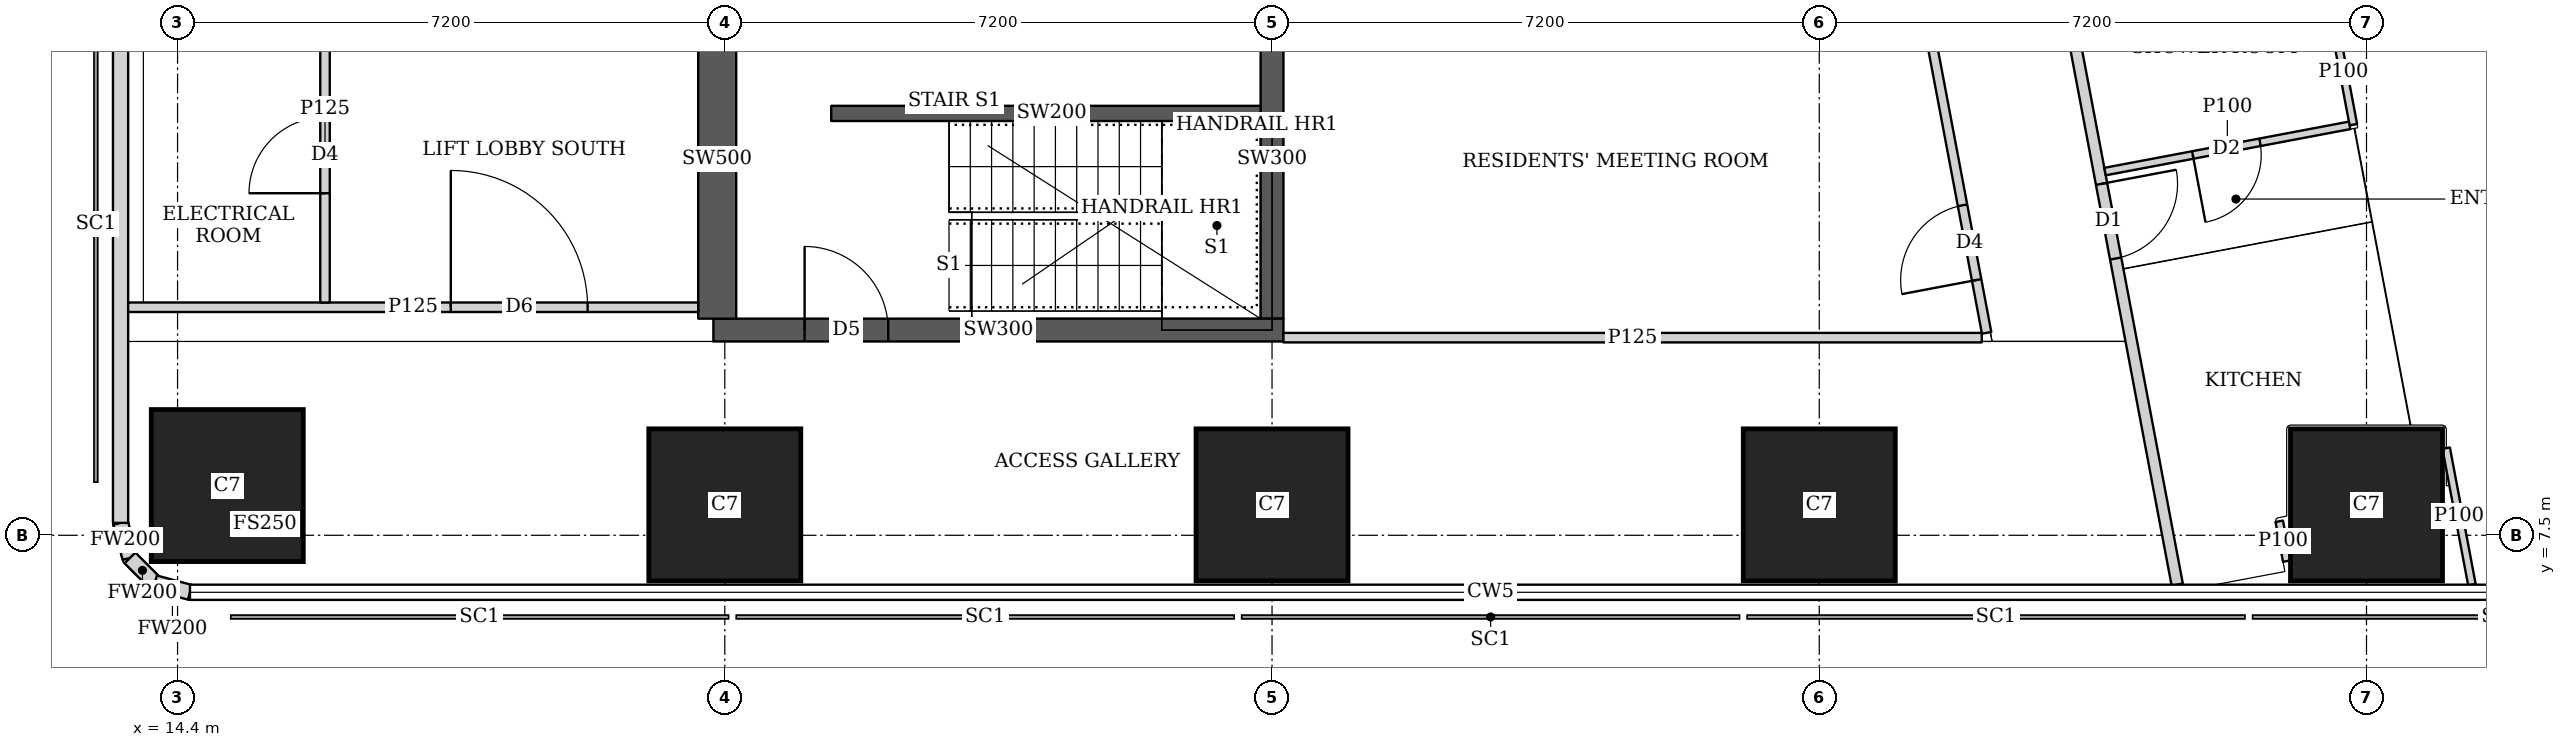
"""IFC4 building model, lengths in metres.
Left out: names, types, materials, properties, quantities, classifications, styles, units other than length and angle.
Written with IfcOpenShell. Run it as: python <this file> out.ifc"""

import sys

from ifc_helpers import new_model, si_unit, direction, frame, frame_2d, origin, origin_2d, place, context, subcontext, project, spatial, rectangle, extrude, element, fill, save


model = new_model("IFC4")
c1 = context("Model", 3, precision=1e-05, world=origin(), true_north=direction((0.0, 1.0)))
c2 = subcontext(c1, "Body", "Model", "MODEL_VIEW")
j1 = project(units=[si_unit("LENGTHUNIT", "METRE"), si_unit("PLANEANGLEUNIT", "RADIAN")], contexts=[c1])
p1 = place(None, origin())
s1 = spatial("IfcSite", under=j1, at=p1, CompositionType="ELEMENT")
p2 = place(p1, origin())
s2 = spatial("IfcBuilding", under=s1, at=p2, CompositionType="ELEMENT")
p3 = place(p2, frame((0.0, 0.0, 262.85)))
s3 = spatial("IfcBuildingStorey", under=s2, at=p3, CompositionType="ELEMENT", Elevation=262.85)
for number, where, z_axis, x_axis in (
    (1, (15.054, 8.154, 0.0), (0.0, 0.0, 1.0), (1.0, 0.0, 0.0)),
    (2, (21.6, 7.9, 0.0), (0.0, 0.0, 1.0), (1.0, 0.0, 0.0)),
    (3, (28.8, 7.9, 0.0), (0.0, 0.0, 1.0), (1.0, 0.0, 0.0)),
    (4, (36.0, 7.9, 0.0), (0.0, 0.0, 1.0), (1.0, 0.0, 0.0)),
    (5, (43.2, 7.9, 0.0), (0.0, 0.0, 1.0), (1.0, 0.0, 0.0)),
):
    element("IfcColumn", number, at=place(p3, frame(where, z_axis=z_axis, x_axis=x_axis)), inside=s3, PredefinedType="COLUMN", context=c2, shape_type="SweptSolid", body=[
        extrude(rectangle(XDim=2.0, YDim=2.0, at=origin_2d()), origin(), (0.0, 0.0, 1.0), 3.75),
    ])
p4 = place(p3, frame((21.45, 10.2, 0.0), z_axis=(0.0, 0.0, 1.0), x_axis=(1.0, 0.0, 0.0)))
e6 = element("IfcWall", 6, at=p4, inside=s3, PredefinedType="SHEAR", context=c2, shape_type="SweptSolid", body=[
    extrude(rectangle(XDim=7.5, YDim=0.3, at=frame_2d((3.75, 0.0))), origin(), (0.0, 0.0, 1.0), 3.75),
])
p5 = place(p4, frame((1.2, 0.0, 0.0)))
e7 = element("IfcOpeningElement", 7, at=p5, cuts=e6, PredefinedType="OPENING", context=c2, shape_type="SweptSolid", body=[
    extrude(rectangle(XDim=1.1, YDim=2.1, at=frame_2d((0.55, 1.05))), frame((0.0, 0.16, 0.0), z_axis=(0.0, -1.0, 0.0), x_axis=(1.0, 0.0, 0.0)), (0.0, 0.0, 1.0), 0.32),
])
p6 = place(p3, frame((21.5, 10.35, 0.0), z_axis=(0.0, 0.0, 1.0), x_axis=(0.0, 1.0, 0.0)))
e8 = element("IfcWall", 8, at=p6, inside=s3, PredefinedType="SHEAR", context=c2, shape_type="SweptSolid", body=[
    extrude(rectangle(XDim=4.2, YDim=0.5, at=frame_2d((2.1, 0.0))), origin(), (0.0, 0.0, 1.0), 3.75),
])
p7 = place(p3, frame((28.8, 10.35, 0.0), z_axis=(0.0, 0.0, 1.0), x_axis=(0.0, 1.0, 0.0)))
e9 = element("IfcWall", 9, at=p7, inside=s3, PredefinedType="SHEAR", context=c2, shape_type="SweptSolid", body=[
    extrude(rectangle(XDim=4.2, YDim=0.3, at=frame_2d((2.1, 0.0))), origin(), (0.0, 0.0, 1.0), 3.75),
])
p8 = place(p3, frame((49.684, 7.832, 0.0), z_axis=(0.0, 0.0, 1.0), x_axis=(-0.185616669694, 0.982622232565, 0.0)))
e10 = element("IfcWall", 10, at=p8, inside=s3, PredefinedType="SOLIDWALL", context=c2, shape_type="SweptSolid", body=[
    extrude(rectangle(XDim=36.0, YDim=0.2, at=frame_2d((18.0, 0.0))), origin(), (0.0, 0.0, 1.0), 3.5),
])
p9 = place(p8, frame((2.518, 0.0, 0.9)))
e11 = element("IfcOpeningElement", 11, at=p9, cuts=e10, PredefinedType="OPENING", context=c2, shape_type="SweptSolid", body=[
    extrude(rectangle(XDim=2.4, YDim=1.5, at=frame_2d((1.2, 0.75))), frame((0.0, 0.11, 0.0), z_axis=(0.0, -1.0, 0.0), x_axis=(1.0, 0.0, 0.0)), (0.0, 0.0, 1.0), 0.22),
])
p10 = place(p8, frame((8.444, 0.0, 0.9)))
e12 = element("IfcOpeningElement", 12, at=p10, cuts=e10, PredefinedType="OPENING", context=c2, shape_type="SweptSolid", body=[
    extrude(rectangle(XDim=1.8, YDim=1.5, at=frame_2d((0.9, 0.75))), frame((0.0, 0.11, 0.0), z_axis=(0.0, -1.0, 0.0), x_axis=(1.0, 0.0, 0.0)), (0.0, 0.0, 1.0), 0.22),
])
p11 = place(p8, frame((12.261, 0.0, 0.9)))
e13 = element("IfcOpeningElement", 13, at=p11, cuts=e10, PredefinedType="OPENING", context=c2, shape_type="SweptSolid", body=[
    extrude(rectangle(XDim=1.8, YDim=1.5, at=frame_2d((0.9, 0.75))), frame((0.0, 0.11, 0.0), z_axis=(0.0, -1.0, 0.0), x_axis=(1.0, 0.0, 0.0)), (0.0, 0.0, 1.0), 0.22),
])
p12 = place(p8, frame((16.078, 0.0, 0.9)))
e14 = element("IfcOpeningElement", 14, at=p12, cuts=e10, PredefinedType="OPENING", context=c2, shape_type="SweptSolid", body=[
    extrude(rectangle(XDim=1.8, YDim=1.5, at=frame_2d((0.9, 0.75))), frame((0.0, 0.11, 0.0), z_axis=(0.0, -1.0, 0.0), x_axis=(1.0, 0.0, 0.0)), (0.0, 0.0, 1.0), 0.22),
])
p13 = place(p8, frame((19.894, 0.0, 0.9)))
e15 = element("IfcOpeningElement", 15, at=p13, cuts=e10, PredefinedType="OPENING", context=c2, shape_type="SweptSolid", body=[
    extrude(rectangle(XDim=1.8, YDim=1.5, at=frame_2d((0.9, 0.75))), frame((0.0, 0.11, 0.0), z_axis=(0.0, -1.0, 0.0), x_axis=(1.0, 0.0, 0.0)), (0.0, 0.0, 1.0), 0.22),
])
p14 = place(p8, frame((23.71, 0.0, 0.9)))
e16 = element("IfcOpeningElement", 16, at=p14, cuts=e10, PredefinedType="OPENING", context=c2, shape_type="SweptSolid", body=[
    extrude(rectangle(XDim=1.8, YDim=1.5, at=frame_2d((0.9, 0.75))), frame((0.0, 0.11, 0.0), z_axis=(0.0, -1.0, 0.0), x_axis=(1.0, 0.0, 0.0)), (0.0, 0.0, 1.0), 0.22),
])
p15 = place(p8, frame((27.526, 0.0, 0.9)))
e17 = element("IfcOpeningElement", 17, at=p15, cuts=e10, PredefinedType="OPENING", context=c2, shape_type="SweptSolid", body=[
    extrude(rectangle(XDim=1.8, YDim=1.5, at=frame_2d((0.9, 0.75))), frame((0.0, 0.11, 0.0), z_axis=(0.0, -1.0, 0.0), x_axis=(1.0, 0.0, 0.0)), (0.0, 0.0, 1.0), 0.22),
])
p16 = place(p8, frame((32.046, 0.0, 0.9)))
e18 = element("IfcOpeningElement", 18, at=p16, cuts=e10, PredefinedType="OPENING", context=c2, shape_type="SweptSolid", body=[
    extrude(rectangle(XDim=1.8, YDim=1.5, at=frame_2d((0.9, 0.75))), frame((0.0, 0.11, 0.0), z_axis=(0.0, -1.0, 0.0), x_axis=(1.0, 0.0, 0.0)), (0.0, 0.0, 1.0), 0.22),
])
p17 = place(p3, frame((13.65, 43.037, 0.0), z_axis=(0.0, 0.0, 1.0), x_axis=(0.0, -1.0, 0.0)))
e19 = element("IfcWall", 19, at=p17, inside=s3, PredefinedType="SOLIDWALL", context=c2, shape_type="SweptSolid", body=[
    extrude(rectangle(XDim=35.374, YDim=0.2, at=frame_2d((17.687, 0.0))), origin(), (0.0, 0.0, 1.0), 3.5),
])
p18 = place(p17, frame((1.959, 0.0, 0.9)))
e20 = element("IfcOpeningElement", 20, at=p18, cuts=e19, PredefinedType="OPENING", context=c2, shape_type="SweptSolid", body=[
    extrude(rectangle(XDim=1.8, YDim=1.5, at=frame_2d((0.9, 0.75))), frame((0.0, 0.11, 0.0), z_axis=(0.0, -1.0, 0.0), x_axis=(1.0, 0.0, 0.0)), (0.0, 0.0, 1.0), 0.22),
])
p19 = place(p3, frame((13.65, 7.663, 0.0), z_axis=(0.0, 0.0, 1.0), x_axis=(0.259698463175, -0.965689757751, 0.0)))
e21 = element("IfcWall", 21, at=p19, inside=s3, PredefinedType="SOLIDWALL", context=c2, shape_type="SweptSolid", body=[
    extrude(rectangle(XDim=0.478, YDim=0.2, at=frame_2d((0.239, 0.0))), origin(), (0.0, 0.0, 1.0), 3.5),
])
p20 = place(p3, frame((13.774, 7.202, 0.0), z_axis=(0.0, 0.0, 1.0), x_axis=(0.707369890659, -0.706843573776, 0.0)))
e22 = element("IfcWall", 22, at=p20, inside=s3, PredefinedType="SOLIDWALL", context=c2, shape_type="SweptSolid", body=[
    extrude(rectangle(XDim=0.464, YDim=0.2, at=frame_2d((0.232, 0.0))), origin(), (0.0, 0.0, 1.0), 3.5),
])
p21 = place(p3, frame((14.102, 6.874, 0.0), z_axis=(0.0, 0.0, 1.0), x_axis=(0.965655254015, -0.259826731483, 0.0)))
e23 = element("IfcWall", 23, at=p21, inside=s3, PredefinedType="SOLIDWALL", context=c2, shape_type="SweptSolid", body=[
    extrude(rectangle(XDim=0.477, YDim=0.2, at=frame_2d((0.239, 0.0))), origin(), (0.0, 0.0, 1.0), 3.5),
])
p22 = place(p3, frame((34.036, 42.186, 0.0), z_axis=(0.0, 0.0, 1.0), x_axis=(0.185593518645, -0.9826266055, 0.0)))
e24 = element("IfcWall", 24, at=p22, inside=s3, PredefinedType="SOLIDWALL", context=c2, shape_type="SweptSolid", body=[
    extrude(rectangle(XDim=35.961, YDim=0.15, at=frame_2d((17.98, 0.0))), origin(), (0.0, 0.0, 1.0), 2.5),
])
p23 = place(p22, frame((15.529, 0.0, 0.0)))
e25 = element("IfcOpeningElement", 25, at=p23, cuts=e24, PredefinedType="OPENING", context=c2, shape_type="SweptSolid", body=[
    extrude(rectangle(XDim=1.0, YDim=2.1, at=frame_2d((0.5, 1.05))), frame((0.0, 0.085, 0.0), z_axis=(0.0, -1.0, 0.0), x_axis=(1.0, 0.0, 0.0)), (0.0, 0.0, 1.0), 0.17),
])
p24 = place(p22, frame((19.345, 0.0, 0.0)))
e26 = element("IfcOpeningElement", 26, at=p24, cuts=e24, PredefinedType="OPENING", context=c2, shape_type="SweptSolid", body=[
    extrude(rectangle(XDim=1.0, YDim=2.1, at=frame_2d((0.5, 1.05))), frame((0.0, 0.085, 0.0), z_axis=(0.0, -1.0, 0.0), x_axis=(1.0, 0.0, 0.0)), (0.0, 0.0, 1.0), 0.17),
])
p25 = place(p22, frame((30.594, 0.0, 0.0)))
e27 = element("IfcOpeningElement", 27, at=p25, cuts=e24, PredefinedType="OPENING", context=c2, shape_type="SweptSolid", body=[
    extrude(rectangle(XDim=1.0, YDim=2.1, at=frame_2d((0.5, 1.05))), frame((0.0, 0.085, 0.0), z_axis=(0.0, -1.0, 0.0), x_axis=(1.0, 0.0, 0.0)), (0.0, 0.0, 1.0), 0.17),
])
p26 = place(p3, frame((44.248, 8.646, 0.0), z_axis=(0.0, 0.0, 1.0), x_axis=(0.185417594585, -0.982659816833, 0.0)))
e28 = element("IfcWall", 28, at=p26, inside=s3, PredefinedType="PARTITIONING", context=c2, shape_type="SweptSolid", body=[
    extrude(rectangle(XDim=1.828, YDim=0.1, at=frame_2d((0.914, 0.0))), origin(), (0.0, 0.0, 1.0), 2.05),
])
p27 = place(p3, frame((42.151, 7.16, 0.0), z_axis=(0.0, 0.0, 1.0), x_axis=(-0.185366164644, 0.982669519729, 0.0)))
e29 = element("IfcWall", 29, at=p27, inside=s3, PredefinedType="PARTITIONING", context=c2, shape_type="SweptSolid", body=[
    extrude(rectangle(XDim=0.533, YDim=0.1, at=frame_2d((0.267, 0.0))), origin(), (0.0, 0.0, 1.0), 2.5),
])
p28 = place(p3, frame((42.765, 14.29, 0.0), z_axis=(0.0, 0.0, 1.0), x_axis=(0.185634589628, -0.982618847333, 0.0)))
e30 = element("IfcWall", 30, at=p28, inside=s3, PredefinedType="PARTITIONING", context=c2, shape_type="SweptSolid", body=[
    extrude(rectangle(XDim=1.413, YDim=0.1, at=frame_2d((0.706, 0.0))), origin(), (0.0, 0.0, 1.0), 3.5),
])
p29 = place(p3, frame((42.978, 12.893, 0.0), z_axis=(0.0, 0.0, 1.0), x_axis=(-0.982607026909, -0.185697147715, 0.0)))
e31 = element("IfcWall", 31, at=p29, inside=s3, PredefinedType="PARTITIONING", context=c2, shape_type="SweptSolid", body=[
    extrude(rectangle(XDim=3.275, YDim=0.1, at=frame_2d((1.637, 0.0))), origin(), (0.0, 0.0, 1.0), 3.5),
])
p30 = place(p29, frame((1.2, 0.0, 0.0)))
e32 = element("IfcOpeningElement", 32, at=p30, cuts=e31, PredefinedType="OPENING", context=c2, shape_type="SweptSolid", body=[
    extrude(rectangle(XDim=0.9, YDim=2.1, at=frame_2d((0.45, 1.05))), frame((0.0, 0.06, 0.0), z_axis=(0.0, -1.0, 0.0), x_axis=(1.0, 0.0, 0.0)), (0.0, 0.0, 1.0), 0.12),
])
p31 = place(p3, frame((13.75, 10.5, 0.0), z_axis=(0.0, 0.0, 1.0), x_axis=(1.0, 0.0, 0.0)))
e33 = element("IfcWall", 33, at=p31, inside=s3, PredefinedType="PARTITIONING", context=c2, shape_type="SweptSolid", body=[
    extrude(rectangle(XDim=7.5, YDim=0.125, at=frame_2d((3.75, 0.0))), origin(), (0.0, 0.0, 1.0), 3.5),
])
p32 = place(p31, frame((4.245, 0.0, 0.0)))
e34 = element("IfcOpeningElement", 34, at=p32, cuts=e33, PredefinedType="OPENING", context=c2, shape_type="SweptSolid", body=[
    extrude(rectangle(XDim=1.8, YDim=2.1, at=frame_2d((0.9, 1.05))), frame((0.0, 0.073, 0.0), z_axis=(0.0, -1.0, 0.0), x_axis=(1.0, 0.0, 0.0)), (0.0, 0.0, 1.0), 0.145),
])
p33 = place(p3, frame((16.34, 10.562, 0.0), z_axis=(0.0, 0.0, 1.0), x_axis=(0.0, 1.0, 0.0)))
e35 = element("IfcWall", 35, at=p33, inside=s3, PredefinedType="PARTITIONING", context=c2, shape_type="SweptSolid", body=[
    extrude(rectangle(XDim=3.988, YDim=0.125, at=frame_2d((1.994, 0.0))), origin(), (0.0, 0.0, 1.0), 3.5),
])
p34 = place(p33, frame((1.438, 0.0, 0.0)))
e36 = element("IfcOpeningElement", 36, at=p34, cuts=e35, PredefinedType="OPENING", context=c2, shape_type="SweptSolid", body=[
    extrude(rectangle(XDim=1.0, YDim=2.1, at=frame_2d((0.5, 1.05))), frame((0.0, 0.073, 0.0), z_axis=(0.0, -1.0, 0.0), x_axis=(1.0, 0.0, 0.0)), (0.0, 0.0, 1.0), 0.145),
])
p35 = place(p3, frame((28.95, 10.1, 0.0), z_axis=(0.0, 0.0, 1.0), x_axis=(1.0, 0.0, 0.0)))
e37 = element("IfcWall", 37, at=p35, inside=s3, PredefinedType="PARTITIONING", context=c2, shape_type="SweptSolid", body=[
    extrude(rectangle(XDim=9.188, YDim=0.125, at=frame_2d((4.594, 0.0))), origin(), (0.0, 0.0, 1.0), 3.5),
])
p36 = place(p3, frame((38.202, 10.163, 0.0), z_axis=(0.0, 0.0, 1.0), x_axis=(-0.185610321132, 0.982623431783, 0.0)))
e38 = element("IfcWall", 38, at=p36, inside=s3, PredefinedType="PARTITIONING", context=c2, shape_type="SweptSolid", body=[
    extrude(rectangle(XDim=25.111, YDim=0.125, at=frame_2d((12.556, 0.0))), origin(), (0.0, 0.0, 1.0), 2.5),
])
p37 = place(p36, frame((0.708, 0.0, 0.0)))
e39 = element("IfcOpeningElement", 39, at=p37, cuts=e38, PredefinedType="OPENING", context=c2, shape_type="SweptSolid", body=[
    extrude(rectangle(XDim=1.0, YDim=2.1, at=frame_2d((0.5, 1.05))), frame((0.0, 0.073, 0.0), z_axis=(0.0, -1.0, 0.0), x_axis=(1.0, 0.0, 0.0)), (0.0, 0.0, 1.0), 0.145),
])
p38 = place(p36, frame((5.9, 0.0, 0.0)))
e40 = element("IfcOpeningElement", 40, at=p38, cuts=e38, PredefinedType="OPENING", context=c2, shape_type="SweptSolid", body=[
    extrude(rectangle(XDim=1.0, YDim=2.1, at=frame_2d((0.5, 1.05))), frame((0.0, 0.073, 0.0), z_axis=(0.0, -1.0, 0.0), x_axis=(1.0, 0.0, 0.0)), (0.0, 0.0, 1.0), 0.145),
])
p39 = place(p36, frame((13.378, 0.0, 0.0)))
e41 = element("IfcOpeningElement", 41, at=p39, cuts=e38, PredefinedType="OPENING", context=c2, shape_type="SweptSolid", body=[
    extrude(rectangle(XDim=1.0, YDim=2.1, at=frame_2d((0.5, 1.05))), frame((0.0, 0.073, 0.0), z_axis=(0.0, -1.0, 0.0), x_axis=(1.0, 0.0, 0.0)), (0.0, 0.0, 1.0), 0.145),
])
p40 = place(p36, frame((17.194, 0.0, 0.0)))
e42 = element("IfcOpeningElement", 42, at=p40, cuts=e38, PredefinedType="OPENING", context=c2, shape_type="SweptSolid", body=[
    extrude(rectangle(XDim=1.0, YDim=2.1, at=frame_2d((0.5, 1.05))), frame((0.0, 0.073, 0.0), z_axis=(0.0, -1.0, 0.0), x_axis=(1.0, 0.0, 0.0)), (0.0, 0.0, 1.0), 0.145),
])
p41 = place(p36, frame((21.15, 0.0, 0.0)))
e43 = element("IfcOpeningElement", 43, at=p41, cuts=e38, PredefinedType="OPENING", context=c2, shape_type="SweptSolid", body=[
    extrude(rectangle(XDim=1.0, YDim=2.1, at=frame_2d((0.5, 1.05))), frame((0.0, 0.073, 0.0), z_axis=(0.0, -1.0, 0.0), x_axis=(1.0, 0.0, 0.0)), (0.0, 0.0, 1.0), 0.145),
])
p42 = place(p3, frame((23.0, 13.05, 0.0), z_axis=(0.0, 0.0, 1.0), x_axis=(1.0, 0.0, 0.0)))
e44 = element("IfcWall", 44, at=p42, inside=s3, PredefinedType="SHEAR", context=c2, shape_type="SweptSolid", body=[
    extrude(rectangle(XDim=5.8, YDim=0.2, at=frame_2d((2.9, 0.0))), origin(), (0.0, 0.0, 1.0), 3.75),
])
p43 = place(p30, origin())
e45 = element("IfcDoor", 45, at=p43, inside=s3, OperationType="SINGLE_SWING_RIGHT", PredefinedType="DOOR", context=c2, shape_type="SweptSolid", body=[
    extrude(rectangle(XDim=0.9, YDim=2.1, at=frame_2d((0.45, 1.05))), frame((0.0, 0.025, 0.0), z_axis=(0.0, -1.0, 0.0), x_axis=(1.0, 0.0, 0.0)), (0.0, 0.0, 1.0), 0.05),
])
fill(e32, e45)
p44 = place(p25, origin())
e46 = element("IfcDoor", 46, at=p44, inside=s3, OperationType="SINGLE_SWING_LEFT", PredefinedType="DOOR", context=c2, shape_type="SweptSolid", body=[
    extrude(rectangle(XDim=1.0, YDim=2.1, at=frame_2d((0.5, 1.05))), frame((0.0, 0.025, 0.0), z_axis=(0.0, -1.0, 0.0), x_axis=(1.0, 0.0, 0.0)), (0.0, 0.0, 1.0), 0.05),
])
fill(e27, e46)
p45 = place(p34, origin())
e47 = element("IfcDoor", 47, at=p45, inside=s3, OperationType="SINGLE_SWING_LEFT", PredefinedType="DOOR", context=c2, shape_type="SweptSolid", body=[
    extrude(rectangle(XDim=1.0, YDim=2.1, at=frame_2d((0.5, 1.05))), frame((0.0, 0.025, 0.0), z_axis=(0.0, -1.0, 0.0), x_axis=(1.0, 0.0, 0.0)), (0.0, 0.0, 1.0), 0.05),
])
fill(e36, e47)
p46 = place(p32, origin())
e48 = element("IfcDoor", 48, at=p46, inside=s3, OperationType="DOUBLE_DOOR_SINGLE_SWING", PredefinedType="DOOR", context=c2, shape_type="SweptSolid", body=[
    extrude(rectangle(XDim=1.8, YDim=2.1, at=frame_2d((0.9, 1.05))), frame((0.0, 0.025, 0.0), z_axis=(0.0, -1.0, 0.0), x_axis=(1.0, 0.0, 0.0)), (0.0, 0.0, 1.0), 0.05),
])
fill(e34, e48)
p47 = place(p37, origin())
e49 = element("IfcDoor", 49, at=p47, inside=s3, OperationType="SINGLE_SWING_LEFT", PredefinedType="DOOR", context=c2, shape_type="SweptSolid", body=[
    extrude(rectangle(XDim=1.0, YDim=2.1, at=frame_2d((0.5, 1.05))), frame((0.0, 0.025, 0.0), z_axis=(0.0, -1.0, 0.0), x_axis=(1.0, 0.0, 0.0)), (0.0, 0.0, 1.0), 0.05),
])
fill(e39, e49)
p48 = place(p5, origin())
e50 = element("IfcDoor", 50, at=p48, inside=s3, OperationType="SINGLE_SWING_LEFT", PredefinedType="DOOR", context=c2, shape_type="SweptSolid", body=[
    extrude(rectangle(XDim=1.1, YDim=2.1, at=frame_2d((0.55, 1.05))), frame((0.0, 0.025, 0.0), z_axis=(0.0, -1.0, 0.0), x_axis=(1.0, 0.0, 0.0)), (0.0, 0.0, 1.0), 0.05),
])
fill(e7, e50)
save(model, sys.argv[1])
